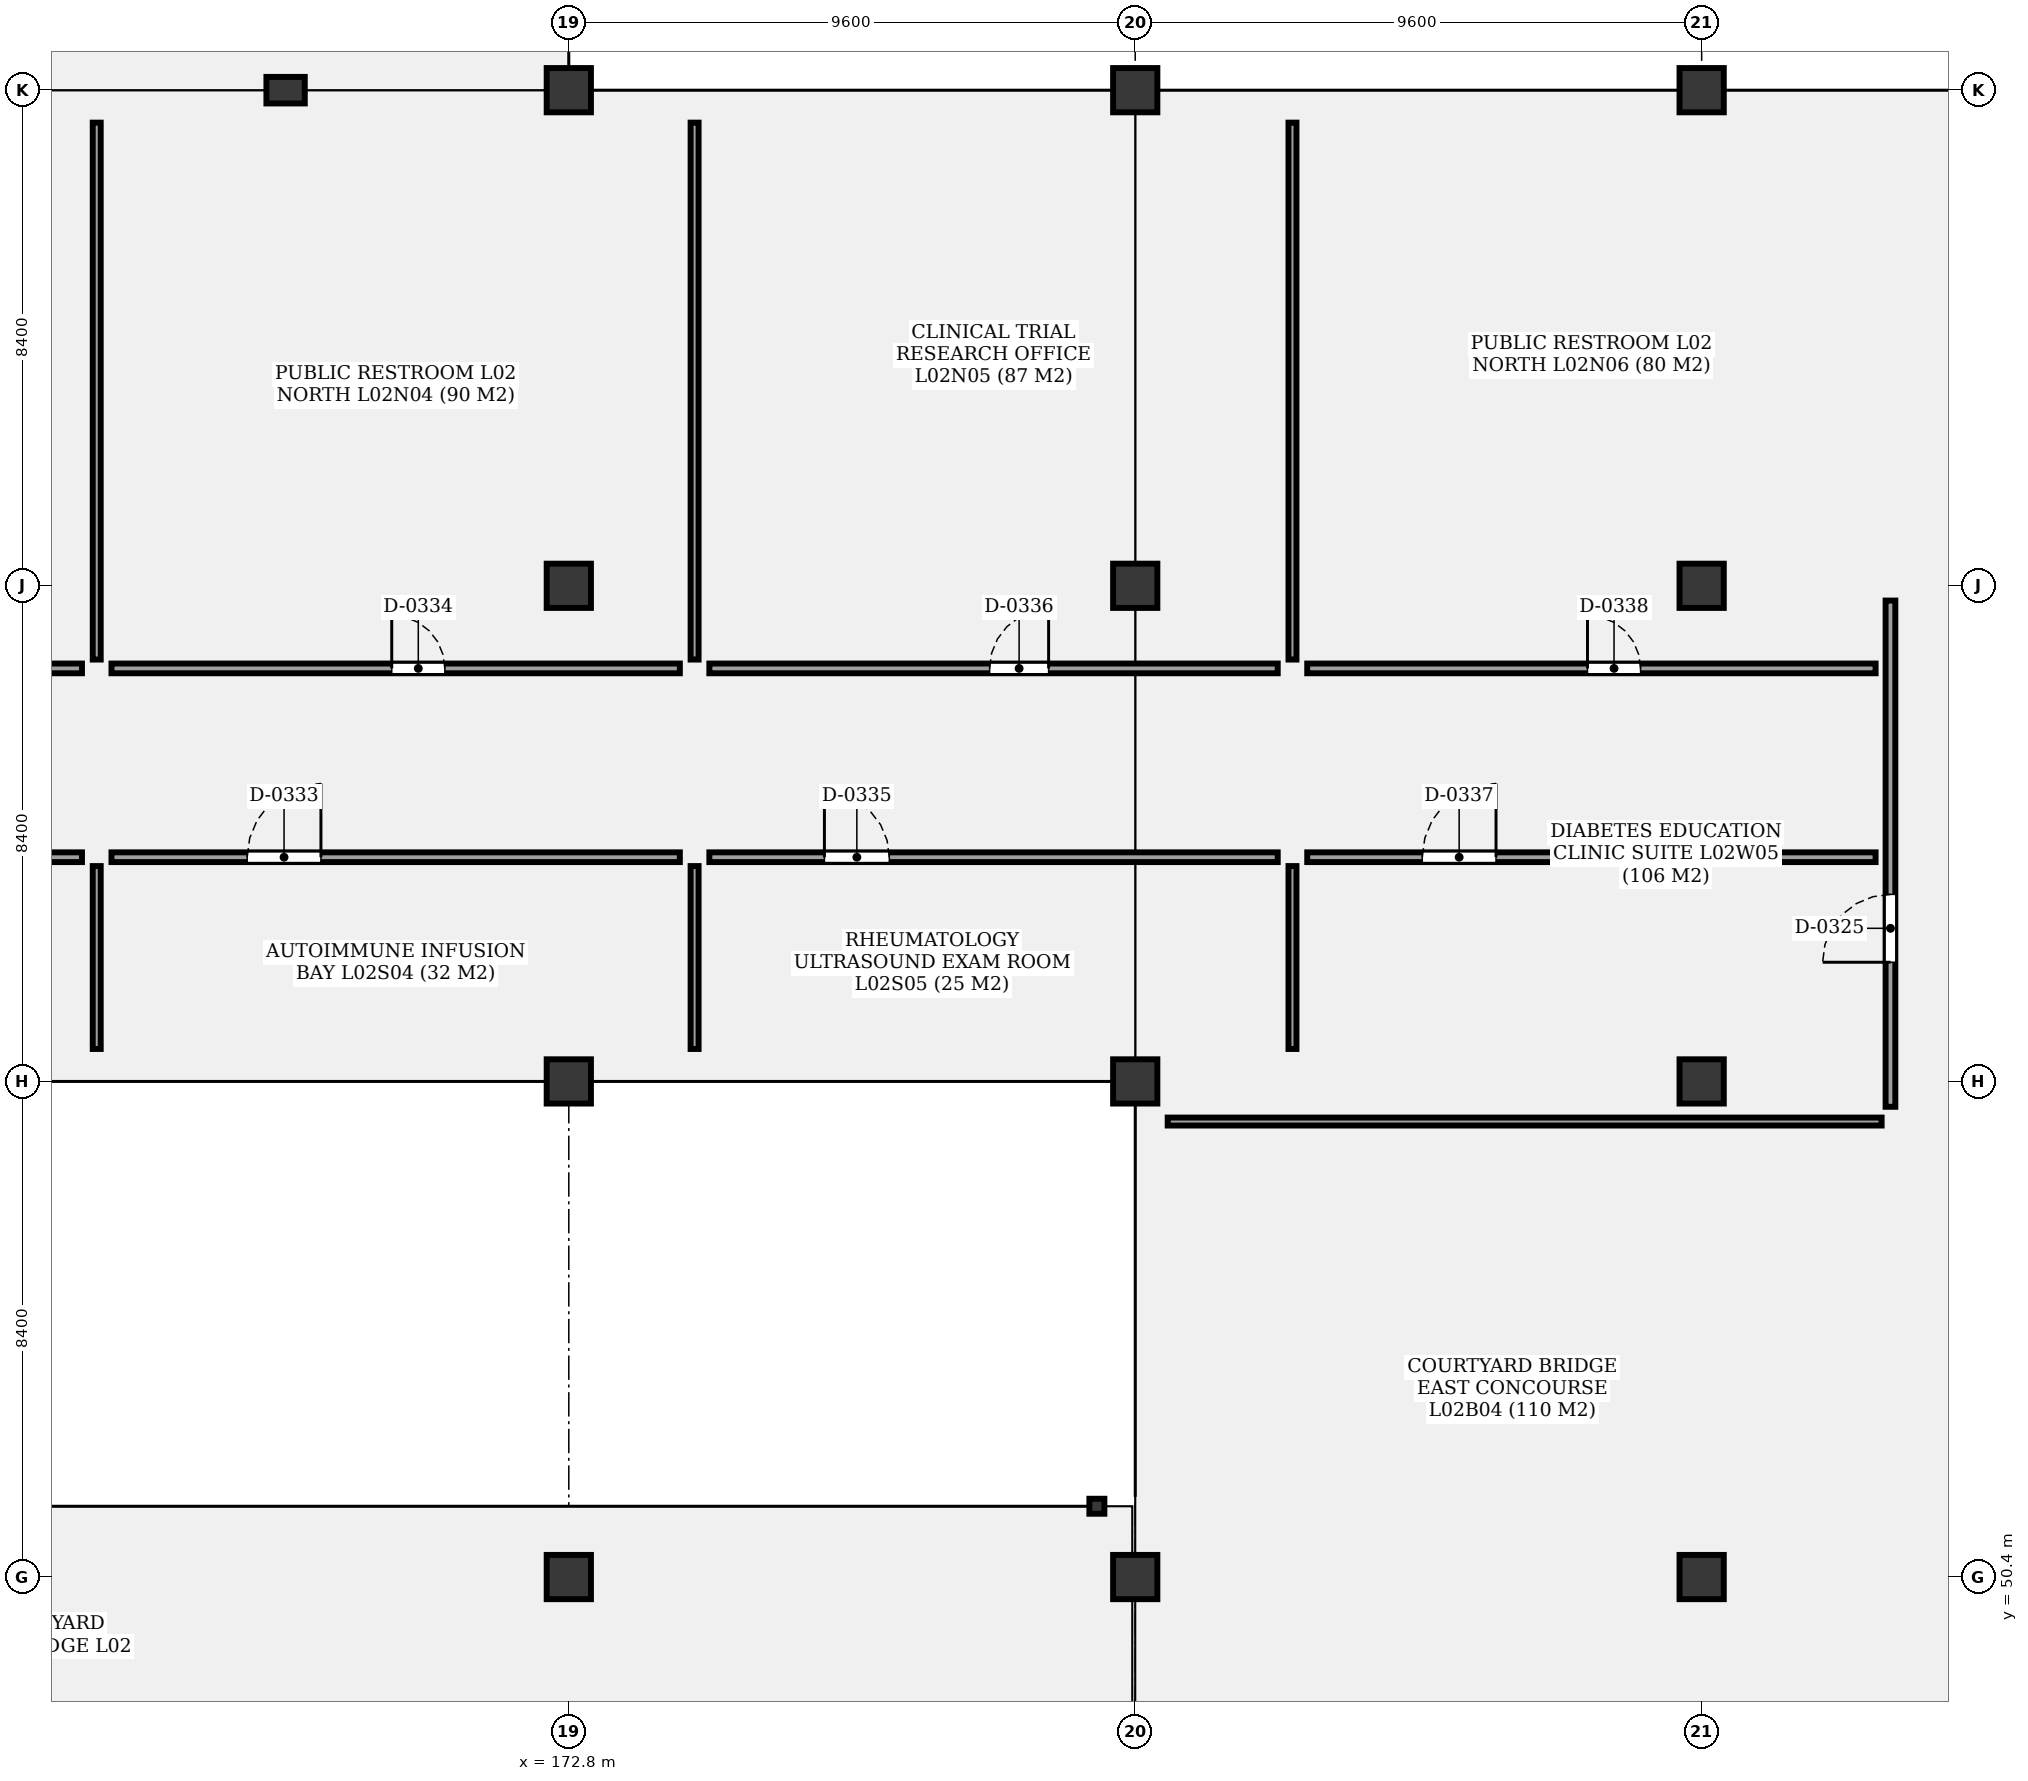
"""IFC4 building model, lengths in metres.
Left out: names, types, materials, properties, quantities, classifications, styles, units other than length and angle.
Written with IfcOpenShell. Run it as: python <this file> out.ifc"""

import sys

from ifc_helpers import new_model, si_unit, direction, frame, frame_2d, origin, origin_2d, place, context, subcontext, project, spatial, rectangle, hollow_rectangle, extrude, element, fill, save


model = new_model("IFC4")
c1 = context("Model", 3, precision=1e-05, world=origin(), true_north=direction((0.0, 1.0)))
c2 = subcontext(c1, "Body", "Model", "MODEL_VIEW")
j1 = project(units=[si_unit("LENGTHUNIT", "METRE"), si_unit("PLANEANGLEUNIT", "RADIAN")], contexts=[c1])
p1 = place(None, origin())
s1 = spatial("IfcSite", under=j1, at=p1, CompositionType="ELEMENT")
p2 = place(p1, origin())
s2 = spatial("IfcBuilding", under=s1, at=p2, CompositionType="ELEMENT")
p3 = place(p2, frame((0.0, 0.0, 9.9)))
s3 = spatial("IfcBuildingStorey", under=s2, at=p3, CompositionType="ELEMENT", Elevation=9.9)
for number, where, z_axis, x_axis in (
    (1, (172.8, 50.4, 0.0), (0.0, 0.0, 1.0), (1.0, 0.0, 0.0)),
    (2, (172.8, 58.8, 0.0), (0.0, 0.0, 1.0), (1.0, 0.0, 0.0)),
    (3, (172.8, 67.2, 0.0), (0.0, 0.0, 1.0), (1.0, 0.0, 0.0)),
    (4, (172.8, 75.6, 0.0), (0.0, 0.0, 1.0), (1.0, 0.0, 0.0)),
):
    element("IfcColumn", number, at=place(p3, frame(where, z_axis=z_axis, x_axis=x_axis)), inside=s3, PredefinedType="COLUMN", context=c2, shape_type="SweptSolid", body=[
        extrude(rectangle(XDim=0.75, YDim=0.75, at=origin_2d()), origin(), (0.0, 0.0, 1.0), 3.6),
    ])
p4 = place(p3, frame((181.75, 51.6, 0.0), z_axis=(0.0, 0.0, 1.0), x_axis=(1.0, 0.0, 0.0)))
e5 = element("IfcColumn", 5, at=p4, inside=s3, PredefinedType="COLUMN", context=c2, shape_type="SweptSolid", body=[
    extrude(hollow_rectangle(XDim=0.254, YDim=0.254, WallThickness=0.013, at=origin_2d()), origin(), (0.0, 0.0, 1.0), 3.38),
])
for number, where, z_axis, x_axis in (
    (6, (182.4, 50.4, 0.0), (0.0, 0.0, 1.0), (1.0, 0.0, 0.0)),
    (7, (182.4, 58.8, 0.0), (0.0, 0.0, 1.0), (1.0, 0.0, 0.0)),
    (8, (182.4, 67.2, 0.0), (0.0, 0.0, 1.0), (1.0, 0.0, 0.0)),
    (9, (182.4, 75.6, 0.0), (0.0, 0.0, 1.0), (1.0, 0.0, 0.0)),
    (10, (192.0, 50.4, 0.0), (0.0, 0.0, 1.0), (1.0, 0.0, 0.0)),
    (11, (192.0, 58.8, 0.0), (0.0, 0.0, 1.0), (1.0, 0.0, 0.0)),
    (12, (192.0, 67.2, 0.0), (0.0, 0.0, 1.0), (1.0, 0.0, 0.0)),
    (13, (192.0, 75.6, 0.0), (0.0, 0.0, 1.0), (1.0, 0.0, 0.0)),
):
    element("IfcColumn", number, at=place(p3, frame(where, z_axis=z_axis, x_axis=x_axis)), inside=s3, PredefinedType="COLUMN", context=c2, shape_type="SweptSolid", body=[
        extrude(rectangle(XDim=0.75, YDim=0.75, at=origin_2d()), origin(), (0.0, 0.0, 1.0), 3.6),
    ])
p5 = place(p3, frame((168.0, 75.6, 0.0), z_axis=(0.0, 0.0, 1.0), x_axis=(1.0, 0.0, 0.0)))
e14 = element("IfcColumn", 14, at=p5, inside=s3, PredefinedType="PILASTER", context=c2, shape_type="SweptSolid", body=[
    extrude(rectangle(XDim=0.65, YDim=0.45, at=origin_2d()), origin(), (0.0, 0.0, 1.0), 3.6),
])
p6 = place(p3, frame((195.2, 58.37, 0.0), z_axis=(0.0, 0.0, 1.0), x_axis=(0.0, 1.0, 0.0)))
e15 = element("IfcWall", 15, at=p6, inside=s3, PredefinedType="PARTITIONING", context=c2, shape_type="SweptSolid", body=[
    extrude(rectangle(XDim=8.58, YDim=0.165, at=frame_2d((4.29, 0.0))), origin(), (0.0, 0.0, 1.0), 2.48),
])
p7 = place(p6, frame((2.45, 0.0, 0.0)))
e16 = element("IfcOpeningElement", 16, at=p7, cuts=e15, PredefinedType="OPENING", context=c2, shape_type="SweptSolid", body=[
    extrude(rectangle(XDim=1.15, YDim=2.2, at=frame_2d((0.575, 1.1))), frame((0.0, 0.093, 0.0), z_axis=(0.0, -1.0, 0.0), x_axis=(1.0, 0.0, 0.0)), (0.0, 0.0, 1.0), 0.185),
])
p8 = place(p3, frame((182.95, 58.12, 0.0), z_axis=(0.0, 0.0, 1.0), x_axis=(1.0, 0.0, 0.0)))
e17 = element("IfcWall", 17, at=p8, inside=s3, PredefinedType="PARTITIONING", context=c2, shape_type="SweptSolid", body=[
    extrude(rectangle(XDim=12.1, YDim=0.135, at=frame_2d((6.05, 0.0))), origin(), (0.0, 0.0, 1.0), 2.48),
])
p9 = place(p3, frame((154.916, 62.6, 0.0), z_axis=(0.0, 0.0, 1.0), x_axis=(1.0, 0.0, 0.0)))
e18 = element("IfcWall", 18, at=p9, inside=s3, PredefinedType="PARTITIONING", context=c2, shape_type="SweptSolid", body=[
    extrude(rectangle(XDim=9.633, YDim=0.165, at=frame_2d((4.816, 0.0))), origin(), (0.0, 0.0, 1.0), 2.48),
])
p10 = place(p9, frame((2.65, 0.0, 0.0)))
e19 = element("IfcOpeningElement", 19, at=p10, cuts=e18, PredefinedType="OPENING", context=c2, shape_type="SweptSolid", body=[
    extrude(rectangle(XDim=1.1, YDim=2.1, at=frame_2d((0.55, 1.05))), frame((0.0, 0.093, 0.0), z_axis=(0.0, -1.0, 0.0), x_axis=(1.0, 0.0, 0.0)), (0.0, 0.0, 1.0), 0.185),
])
p11 = place(p3, frame((154.916, 65.8, 0.0), z_axis=(0.0, 0.0, 1.0), x_axis=(1.0, 0.0, 0.0)))
e20 = element("IfcWall", 20, at=p11, inside=s3, PredefinedType="PARTITIONING", context=c2, shape_type="SweptSolid", body=[
    extrude(rectangle(XDim=9.633, YDim=0.165, at=frame_2d((4.816, 0.0))), origin(), (0.0, 0.0, 1.0), 2.48),
])
p12 = place(p11, frame((4.75, 0.0, 0.0)))
e21 = element("IfcOpeningElement", 21, at=p12, cuts=e20, PredefinedType="OPENING", context=c2, shape_type="SweptSolid", body=[
    extrude(rectangle(XDim=1.0, YDim=2.2, at=frame_2d((0.5, 1.1))), frame((0.0, 0.093, 0.0), z_axis=(0.0, -1.0, 0.0), x_axis=(1.0, 0.0, 0.0)), (0.0, 0.0, 1.0), 0.185),
])
p13 = place(p3, frame((165.049, 62.6, 0.0), z_axis=(0.0, 0.0, 1.0), x_axis=(1.0, 0.0, 0.0)))
e22 = element("IfcWall", 22, at=p13, inside=s3, PredefinedType="PARTITIONING", context=c2, shape_type="SweptSolid", body=[
    extrude(rectangle(XDim=9.633, YDim=0.165, at=frame_2d((4.816, 0.0))), origin(), (0.0, 0.0, 1.0), 2.48),
])
p14 = place(p13, frame((2.3, 0.0, 0.0)))
e23 = element("IfcOpeningElement", 23, at=p14, cuts=e22, PredefinedType="OPENING", context=c2, shape_type="SweptSolid", body=[
    extrude(rectangle(XDim=1.25, YDim=2.2, at=frame_2d((0.625, 1.1))), frame((0.0, 0.093, 0.0), z_axis=(0.0, -1.0, 0.0), x_axis=(1.0, 0.0, 0.0)), (0.0, 0.0, 1.0), 0.185),
])
p15 = place(p3, frame((164.799, 59.35, 0.0), z_axis=(0.0, 0.0, 1.0), x_axis=(0.0, 1.0, 0.0)))
e24 = element("IfcWall", 24, at=p15, inside=s3, PredefinedType="PARTITIONING", context=c2, shape_type="SweptSolid", body=[
    extrude(rectangle(XDim=3.1, YDim=0.135, at=frame_2d((1.55, 0.0))), origin(), (0.0, 0.0, 1.0), 2.48),
])
p16 = place(p3, frame((165.049, 65.8, 0.0), z_axis=(0.0, 0.0, 1.0), x_axis=(1.0, 0.0, 0.0)))
e25 = element("IfcWall", 25, at=p16, inside=s3, PredefinedType="PARTITIONING", context=c2, shape_type="SweptSolid", body=[
    extrude(rectangle(XDim=9.633, YDim=0.165, at=frame_2d((4.816, 0.0))), origin(), (0.0, 0.0, 1.0), 2.48),
])
p17 = place(p16, frame((4.75, 0.0, 0.0)))
e26 = element("IfcOpeningElement", 26, at=p17, cuts=e25, PredefinedType="OPENING", context=c2, shape_type="SweptSolid", body=[
    extrude(rectangle(XDim=0.9, YDim=2.1, at=frame_2d((0.45, 1.05))), frame((0.0, 0.093, 0.0), z_axis=(0.0, -1.0, 0.0), x_axis=(1.0, 0.0, 0.0)), (0.0, 0.0, 1.0), 0.185),
])
p18 = place(p3, frame((164.799, 65.95, 0.0), z_axis=(0.0, 0.0, 1.0), x_axis=(0.0, 1.0, 0.0)))
e27 = element("IfcWall", 27, at=p18, inside=s3, PredefinedType="PARTITIONING", context=c2, shape_type="SweptSolid", body=[
    extrude(rectangle(XDim=9.1, YDim=0.135, at=frame_2d((4.55, 0.0))), origin(), (0.0, 0.0, 1.0), 2.48),
])
p19 = place(p3, frame((175.182, 62.6, 0.0), z_axis=(0.0, 0.0, 1.0), x_axis=(1.0, 0.0, 0.0)))
e28 = element("IfcWall", 28, at=p19, inside=s3, PredefinedType="PARTITIONING", context=c2, shape_type="SweptSolid", body=[
    extrude(rectangle(XDim=9.633, YDim=0.165, at=frame_2d((4.816, 0.0))), origin(), (0.0, 0.0, 1.0), 2.48),
])
p20 = place(p19, frame((1.95, 0.0, 0.0)))
e29 = element("IfcOpeningElement", 29, at=p20, cuts=e28, PredefinedType="OPENING", context=c2, shape_type="SweptSolid", body=[
    extrude(rectangle(XDim=1.1, YDim=2.1, at=frame_2d((0.55, 1.05))), frame((0.0, 0.093, 0.0), z_axis=(0.0, -1.0, 0.0), x_axis=(1.0, 0.0, 0.0)), (0.0, 0.0, 1.0), 0.185),
])
p21 = place(p3, frame((174.932, 59.35, 0.0), z_axis=(0.0, 0.0, 1.0), x_axis=(0.0, 1.0, 0.0)))
e30 = element("IfcWall", 30, at=p21, inside=s3, PredefinedType="PARTITIONING", context=c2, shape_type="SweptSolid", body=[
    extrude(rectangle(XDim=3.1, YDim=0.135, at=frame_2d((1.55, 0.0))), origin(), (0.0, 0.0, 1.0), 2.48),
])
p22 = place(p3, frame((175.182, 65.8, 0.0), z_axis=(0.0, 0.0, 1.0), x_axis=(1.0, 0.0, 0.0)))
e31 = element("IfcWall", 31, at=p22, inside=s3, PredefinedType="PARTITIONING", context=c2, shape_type="SweptSolid", body=[
    extrude(rectangle(XDim=9.633, YDim=0.165, at=frame_2d((4.816, 0.0))), origin(), (0.0, 0.0, 1.0), 2.48),
])
p23 = place(p22, frame((4.75, 0.0, 0.0)))
e32 = element("IfcOpeningElement", 32, at=p23, cuts=e31, PredefinedType="OPENING", context=c2, shape_type="SweptSolid", body=[
    extrude(rectangle(XDim=1.0, YDim=2.2, at=frame_2d((0.5, 1.1))), frame((0.0, 0.093, 0.0), z_axis=(0.0, -1.0, 0.0), x_axis=(1.0, 0.0, 0.0)), (0.0, 0.0, 1.0), 0.185),
])
p24 = place(p3, frame((174.932, 65.95, 0.0), z_axis=(0.0, 0.0, 1.0), x_axis=(0.0, 1.0, 0.0)))
e33 = element("IfcWall", 33, at=p24, inside=s3, PredefinedType="PARTITIONING", context=c2, shape_type="SweptSolid", body=[
    extrude(rectangle(XDim=9.1, YDim=0.135, at=frame_2d((4.55, 0.0))), origin(), (0.0, 0.0, 1.0), 2.48),
])
p25 = place(p3, frame((185.315, 62.6, 0.0), z_axis=(0.0, 0.0, 1.0), x_axis=(1.0, 0.0, 0.0)))
e34 = element("IfcWall", 34, at=p25, inside=s3, PredefinedType="PARTITIONING", context=c2, shape_type="SweptSolid", body=[
    extrude(rectangle(XDim=9.633, YDim=0.165, at=frame_2d((4.816, 0.0))), origin(), (0.0, 0.0, 1.0), 2.48),
])
p26 = place(p25, frame((1.95, 0.0, 0.0)))
e35 = element("IfcOpeningElement", 35, at=p26, cuts=e34, PredefinedType="OPENING", context=c2, shape_type="SweptSolid", body=[
    extrude(rectangle(XDim=1.25, YDim=2.2, at=frame_2d((0.625, 1.1))), frame((0.0, 0.093, 0.0), z_axis=(0.0, -1.0, 0.0), x_axis=(1.0, 0.0, 0.0)), (0.0, 0.0, 1.0), 0.185),
])
p27 = place(p3, frame((185.065, 59.35, 0.0), z_axis=(0.0, 0.0, 1.0), x_axis=(0.0, 1.0, 0.0)))
e36 = element("IfcWall", 36, at=p27, inside=s3, PredefinedType="PARTITIONING", context=c2, shape_type="SweptSolid", body=[
    extrude(rectangle(XDim=3.1, YDim=0.135, at=frame_2d((1.55, 0.0))), origin(), (0.0, 0.0, 1.0), 2.48),
])
p28 = place(p3, frame((185.315, 65.8, 0.0), z_axis=(0.0, 0.0, 1.0), x_axis=(1.0, 0.0, 0.0)))
e37 = element("IfcWall", 37, at=p28, inside=s3, PredefinedType="PARTITIONING", context=c2, shape_type="SweptSolid", body=[
    extrude(rectangle(XDim=9.633, YDim=0.165, at=frame_2d((4.816, 0.0))), origin(), (0.0, 0.0, 1.0), 2.48),
])
p29 = place(p28, frame((4.75, 0.0, 0.0)))
e38 = element("IfcOpeningElement", 38, at=p29, cuts=e37, PredefinedType="OPENING", context=c2, shape_type="SweptSolid", body=[
    extrude(rectangle(XDim=0.9, YDim=2.1, at=frame_2d((0.45, 1.05))), frame((0.0, 0.093, 0.0), z_axis=(0.0, -1.0, 0.0), x_axis=(1.0, 0.0, 0.0)), (0.0, 0.0, 1.0), 0.185),
])
p30 = place(p3, frame((185.065, 65.95, 0.0), z_axis=(0.0, 0.0, 1.0), x_axis=(0.0, 1.0, 0.0)))
e39 = element("IfcWall", 39, at=p30, inside=s3, PredefinedType="PARTITIONING", context=c2, shape_type="SweptSolid", body=[
    extrude(rectangle(XDim=9.1, YDim=0.135, at=frame_2d((4.55, 0.0))), origin(), (0.0, 0.0, 1.0), 2.48),
])
p31 = place(p7, origin())
e40 = element("IfcDoor", 40, at=p31, inside=s3, OperationType="SINGLE_SWING_LEFT", PredefinedType="DOOR", context=c2, shape_type="SweptSolid", body=[
    extrude(rectangle(XDim=1.15, YDim=2.2, at=frame_2d((0.575, 1.1))), frame((0.0, 0.025, 0.0), z_axis=(0.0, -1.0, 0.0), x_axis=(1.0, 0.0, 0.0)), (0.0, 0.0, 1.0), 0.05),
])
fill(e16, e40)
p32 = place(p14, origin())
e41 = element("IfcDoor", 41, at=p32, inside=s3, OperationType="SINGLE_SWING_RIGHT", PredefinedType="DOOR", context=c2, shape_type="SweptSolid", body=[
    extrude(rectangle(XDim=1.25, YDim=2.2, at=frame_2d((0.625, 1.1))), frame((0.0, 0.025, 0.0), z_axis=(0.0, -1.0, 0.0), x_axis=(1.0, 0.0, 0.0)), (0.0, 0.0, 1.0), 0.05),
])
fill(e23, e41)
p33 = place(p17, origin())
e42 = element("IfcDoor", 42, at=p33, inside=s3, OperationType="SINGLE_SWING_LEFT", PredefinedType="DOOR", context=c2, shape_type="SweptSolid", body=[
    extrude(rectangle(XDim=0.9, YDim=2.1, at=frame_2d((0.45, 1.05))), frame((0.0, 0.025, 0.0), z_axis=(0.0, -1.0, 0.0), x_axis=(1.0, 0.0, 0.0)), (0.0, 0.0, 1.0), 0.05),
])
fill(e26, e42)
p34 = place(p20, origin())
e43 = element("IfcDoor", 43, at=p34, inside=s3, OperationType="SINGLE_SWING_LEFT", PredefinedType="DOOR", context=c2, shape_type="SweptSolid", body=[
    extrude(rectangle(XDim=1.1, YDim=2.1, at=frame_2d((0.55, 1.05))), frame((0.0, 0.025, 0.0), z_axis=(0.0, -1.0, 0.0), x_axis=(1.0, 0.0, 0.0)), (0.0, 0.0, 1.0), 0.05),
])
fill(e29, e43)
p35 = place(p23, origin())
e44 = element("IfcDoor", 44, at=p35, inside=s3, OperationType="SINGLE_SWING_RIGHT", PredefinedType="DOOR", context=c2, shape_type="SweptSolid", body=[
    extrude(rectangle(XDim=1.0, YDim=2.2, at=frame_2d((0.5, 1.1))), frame((0.0, 0.025, 0.0), z_axis=(0.0, -1.0, 0.0), x_axis=(1.0, 0.0, 0.0)), (0.0, 0.0, 1.0), 0.05),
])
fill(e32, e44)
p36 = place(p26, origin())
e45 = element("IfcDoor", 45, at=p36, inside=s3, OperationType="SINGLE_SWING_RIGHT", PredefinedType="DOOR", context=c2, shape_type="SweptSolid", body=[
    extrude(rectangle(XDim=1.25, YDim=2.2, at=frame_2d((0.625, 1.1))), frame((0.0, 0.025, 0.0), z_axis=(0.0, -1.0, 0.0), x_axis=(1.0, 0.0, 0.0)), (0.0, 0.0, 1.0), 0.05),
])
fill(e35, e45)
p37 = place(p29, origin())
e46 = element("IfcDoor", 46, at=p37, inside=s3, OperationType="SINGLE_SWING_LEFT", PredefinedType="DOOR", context=c2, shape_type="SweptSolid", body=[
    extrude(rectangle(XDim=0.9, YDim=2.1, at=frame_2d((0.45, 1.05))), frame((0.0, 0.025, 0.0), z_axis=(0.0, -1.0, 0.0), x_axis=(1.0, 0.0, 0.0)), (0.0, 0.0, 1.0), 0.05),
])
fill(e38, e46)
save(model, sys.argv[1])
